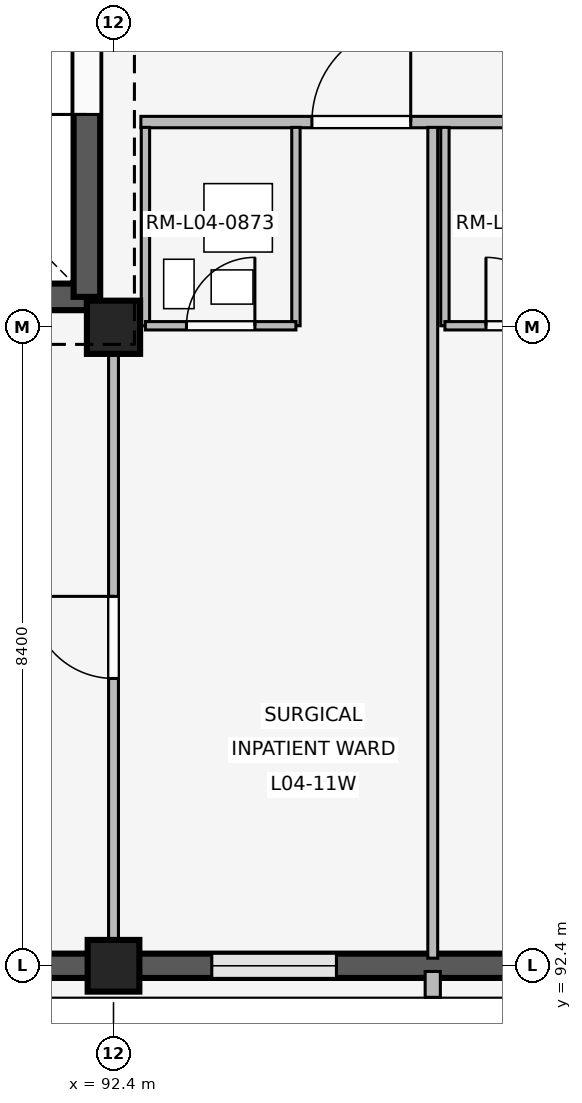
"""IFC4 building model, lengths in metres.
Left out: names, types, materials, properties, quantities, classifications, styles, units other than length and angle.
Written with IfcOpenShell. Run it as: python <this file> out.ifc"""

import sys

from ifc_helpers import new_model, si_unit, direction, frame, frame_2d, origin, origin_2d, place, context, subcontext, project, spatial, rectangle, extrude, element, fill, save


model = new_model("IFC4")
c1 = context("Model", 3, precision=1e-05, world=origin(), true_north=direction((0.0, 1.0)))
c2 = subcontext(c1, "Body", "Model", "MODEL_VIEW")
j1 = project(units=[si_unit("LENGTHUNIT", "METRE"), si_unit("PLANEANGLEUNIT", "RADIAN")], contexts=[c1])
p1 = place(None, origin())
s1 = spatial("IfcSite", under=j1, at=p1, CompositionType="ELEMENT")
p2 = place(p1, origin())
s2 = spatial("IfcBuilding", under=s1, at=p2, CompositionType="ELEMENT")
p3 = place(p2, frame((0.0, 0.0, 16.2)))
s3 = spatial("IfcBuildingStorey", under=s2, at=p3, CompositionType="ELEMENT", Elevation=16.2)
p4 = place(p3, frame((92.4, 92.4, 0.0), z_axis=(0.0, 0.0, 1.0), x_axis=(1.0, 0.0, 0.0)))
e1 = element("IfcColumn", 1, at=p4, inside=s3, PredefinedType="COLUMN", context=c2, shape_type="SweptSolid", body=[
    extrude(rectangle(XDim=0.68, YDim=0.68, at=origin_2d()), origin(), (0.0, 0.0, 1.0), 4.2),
])
p5 = place(p3, frame((92.4, 100.8, 0.0), z_axis=(0.0, 0.0, 1.0), x_axis=(1.0, 0.0, 0.0)))
e2 = element("IfcColumn", 2, at=p5, inside=s3, PredefinedType="COLUMN", context=c2, shape_type="SweptSolid", body=[
    extrude(rectangle(XDim=0.7, YDim=0.7, at=origin_2d()), origin(), (0.0, 0.0, 1.0), 4.2),
])
p6 = place(p3, frame((92.065, 92.4, 0.0), z_axis=(0.0, 0.0, 1.0), x_axis=(-1.0, 0.0, 0.0)))
e3 = element("IfcWall", 3, at=p6, inside=s3, PredefinedType="SOLIDWALL", context=c2, shape_type="SweptSolid", body=[
    extrude(rectangle(XDim=7.73, YDim=0.32, at=frame_2d((3.865, 0.0))), origin(), (0.0, 0.0, 1.0), 3.32),
])
p7 = place(p6, frame((1.228, 0.0, 0.85)))
e4 = element("IfcOpeningElement", 4, at=p7, cuts=e3, PredefinedType="OPENING", context=c2, shape_type="SweptSolid", body=[
    extrude(rectangle(XDim=1.1, YDim=1.6, at=frame_2d((0.55, 0.8))), frame((0.0, 0.17, 0.0), z_axis=(0.0, -1.0, 0.0), x_axis=(1.0, 0.0, 0.0)), (0.0, 0.0, 1.0), 0.34),
])
p8 = place(p6, frame((5.402, 0.0, 0.85)))
e5 = element("IfcOpeningElement", 5, at=p8, cuts=e3, PredefinedType="OPENING", context=c2, shape_type="SweptSolid", body=[
    extrude(rectangle(XDim=1.1, YDim=1.6, at=frame_2d((0.55, 0.8))), frame((0.0, 0.17, 0.0), z_axis=(0.0, -1.0, 0.0), x_axis=(1.0, 0.0, 0.0)), (0.0, 0.0, 1.0), 0.34),
])
p9 = place(p3, frame((100.465, 92.4, 0.0), z_axis=(0.0, 0.0, 1.0), x_axis=(-1.0, 0.0, 0.0)))
e6 = element("IfcWall", 6, at=p9, inside=s3, PredefinedType="SOLIDWALL", context=c2, shape_type="SweptSolid", body=[
    extrude(rectangle(XDim=7.73, YDim=0.32, at=frame_2d((3.865, 0.0))), origin(), (0.0, 0.0, 1.0), 3.32),
])
p10 = place(p9, frame((0.958, 0.0, 0.85)))
e7 = element("IfcOpeningElement", 7, at=p10, cuts=e6, PredefinedType="OPENING", context=c2, shape_type="SweptSolid", body=[
    extrude(rectangle(XDim=1.64, YDim=1.75, at=frame_2d((0.82, 0.875))), frame((0.0, 0.17, 0.0), z_axis=(0.0, -1.0, 0.0), x_axis=(1.0, 0.0, 0.0)), (0.0, 0.0, 1.0), 0.34),
])
p11 = place(p9, frame((5.132, 0.0, 0.85)))
e8 = element("IfcOpeningElement", 8, at=p11, cuts=e6, PredefinedType="OPENING", context=c2, shape_type="SweptSolid", body=[
    extrude(rectangle(XDim=1.64, YDim=1.75, at=frame_2d((0.82, 0.875))), frame((0.0, 0.17, 0.0), z_axis=(0.0, -1.0, 0.0), x_axis=(1.0, 0.0, 0.0)), (0.0, 0.0, 1.0), 0.34),
])
p12 = place(p3, frame((96.6, 92.325, 0.0), z_axis=(0.0, 0.0, 1.0), x_axis=(0.0, -1.0, 0.0)))
e9 = element("IfcWall", 9, at=p12, inside=s3, PredefinedType="ELEMENTEDWALL", context=c2, shape_type="SweptSolid", body=[
    extrude(rectangle(XDim=0.34, YDim=0.2, at=frame_2d((0.17, 0.0))), origin(), (0.0, 0.0, 1.0), 3.3),
])
p13 = place(p3, frame((84.55, 101.2, 0.0), z_axis=(0.0, 0.0, 1.0), x_axis=(1.0, 0.0, 0.0)))
e10 = element("IfcWall", 10, at=p13, inside=s3, PredefinedType="SHEAR", context=c2, shape_type="SweptSolid", body=[
    extrude(rectangle(XDim=7.5, YDim=0.35, at=frame_2d((3.75, 0.0))), origin(), (0.0, 0.0, 1.0), 3.92),
])
p14 = place(p13, frame((4.85, 0.0, 0.0)))
e11 = element("IfcOpeningElement", 11, at=p14, cuts=e10, PredefinedType="OPENING", context=c2, shape_type="SweptSolid", body=[
    extrude(rectangle(XDim=1.2, YDim=2.2, at=frame_2d((0.6, 1.1))), frame((0.0, 0.185, 0.0), z_axis=(0.0, -1.0, 0.0), x_axis=(1.0, 0.0, 0.0)), (0.0, 0.0, 1.0), 0.37),
])
p15 = place(p3, frame((92.05, 101.2, 0.0), z_axis=(0.0, 0.0, 1.0), x_axis=(0.0, 1.0, 0.0)))
e12 = element("IfcWall", 12, at=p15, inside=s3, PredefinedType="SHEAR", context=c2, shape_type="SweptSolid", body=[
    extrude(rectangle(XDim=7.55, YDim=0.35, at=frame_2d((3.775, 0.0))), origin(), (0.0, 0.0, 1.0), 3.92),
])
p16 = place(p15, frame((2.4, 0.0, 0.0)))
e13 = element("IfcOpeningElement", 13, at=p16, cuts=e12, PredefinedType="OPENING", context=c2, shape_type="SweptSolid", body=[
    extrude(rectangle(XDim=1.2, YDim=2.2, at=frame_2d((0.6, 1.1))), frame((0.0, 0.185, 0.0), z_axis=(0.0, -1.0, 0.0), x_axis=(1.0, 0.0, 0.0)), (0.0, 0.0, 1.0), 0.37),
])
p17 = place(p3, frame((92.4, 92.54, 0.0), z_axis=(0.0, 0.0, 1.0), x_axis=(0.0, 1.0, 0.0)))
e14 = element("IfcWall", 14, at=p17, inside=s3, PredefinedType="PARTITIONING", context=c2, shape_type="SweptSolid", body=[
    extrude(rectangle(XDim=8.21, YDim=0.13, at=frame_2d((4.105, 0.0))), origin(), (0.0, 0.0, 1.0), 3.3),
])
p18 = place(p17, frame((3.64, 0.0, 0.0)))
e15 = element("IfcOpeningElement", 15, at=p18, cuts=e14, PredefinedType="OPENING", context=c2, shape_type="SweptSolid", body=[
    extrude(rectangle(XDim=1.08, YDim=2.15, at=frame_2d((0.54, 1.075))), frame((0.0, 0.075, 0.0), z_axis=(0.0, -1.0, 0.0), x_axis=(1.0, 0.0, 0.0)), (0.0, 0.0, 1.0), 0.15),
])
p19 = place(p3, frame((92.76, 103.5, 0.0), z_axis=(0.0, 0.0, 1.0), x_axis=(1.0, 0.0, 0.0)))
e16 = element("IfcWall", 16, at=p19, inside=s3, PredefinedType="PARTITIONING", context=c2, shape_type="SweptSolid", body=[
    extrude(rectangle(XDim=7.96, YDim=0.15, at=frame_2d((3.98, 0.0))), origin(), (0.0, 0.0, 1.0), 3.3),
])
p20 = place(p19, frame((2.25, 0.0, 0.0)))
e17 = element("IfcOpeningElement", 17, at=p20, cuts=e16, PredefinedType="OPENING", context=c2, shape_type="SweptSolid", body=[
    extrude(rectangle(XDim=1.3, YDim=2.25, at=frame_2d((0.65, 1.125))), frame((0.0, 0.085, 0.0), z_axis=(0.0, -1.0, 0.0), x_axis=(1.0, 0.0, 0.0)), (0.0, 0.0, 1.0), 0.17),
])
p21 = place(p19, frame((5.95, 0.0, 0.0)))
e18 = element("IfcOpeningElement", 18, at=p21, cuts=e16, PredefinedType="OPENING", context=c2, shape_type="SweptSolid", body=[
    extrude(rectangle(XDim=1.3, YDim=2.25, at=frame_2d((0.65, 1.125))), frame((0.0, 0.085, 0.0), z_axis=(0.0, -1.0, 0.0), x_axis=(1.0, 0.0, 0.0)), (0.0, 0.0, 1.0), 0.17),
])
p22 = place(p3, frame((96.6, 92.5, 0.0), z_axis=(0.0, 0.0, 1.0), x_axis=(0.0, 1.0, 0.0)))
e19 = element("IfcWall", 19, at=p22, inside=s3, PredefinedType="PARTITIONING", context=c2, shape_type="SweptSolid", body=[
    extrude(rectangle(XDim=10.93, YDim=0.13, at=frame_2d((5.465, 0.0))), origin(), (0.0, 0.0, 1.0), 3.3),
])
for number, where, z_axis, x_axis in (
    (20, (92.82, 100.82, 0.0), (0.0, 0.0, 1.0), (0.0, 1.0, 0.0)),
    (21, (94.8, 100.82, 0.0), (0.0, 0.0, 1.0), (0.0, 1.0, 0.0)),
):
    element("IfcWall", number, at=place(p3, frame(where, z_axis=z_axis, x_axis=x_axis)), inside=s3, PredefinedType="PARTITIONING", context=c2, shape_type="SweptSolid", body=[
        extrude(rectangle(XDim=2.61, YDim=0.11, at=frame_2d((1.305, 0.0))), origin(), (0.0, 0.0, 1.0), 3.3),
    ])
p23 = place(p3, frame((92.82, 100.82, 0.0), z_axis=(0.0, 0.0, 1.0), x_axis=(1.0, 0.0, 0.0)))
e22 = element("IfcWall", 22, at=p23, inside=s3, PredefinedType="PARTITIONING", context=c2, shape_type="SweptSolid", body=[
    extrude(rectangle(XDim=1.98, YDim=0.11, at=frame_2d((0.99, 0.0))), origin(), (0.0, 0.0, 1.0), 3.3),
])
p24 = place(p23, frame((0.54, 0.0, 0.0)))
e23 = element("IfcOpeningElement", 23, at=p24, cuts=e22, PredefinedType="OPENING", context=c2, shape_type="SweptSolid", body=[
    extrude(rectangle(XDim=0.9, YDim=2.1, at=frame_2d((0.45, 1.05))), frame((0.0, 0.065, 0.0), z_axis=(0.0, -1.0, 0.0), x_axis=(1.0, 0.0, 0.0)), (0.0, 0.0, 1.0), 0.13),
])
p25 = place(p3, frame((96.76, 100.82, 0.0), z_axis=(0.0, 0.0, 1.0), x_axis=(0.0, 1.0, 0.0)))
e24 = element("IfcWall", 24, at=p25, inside=s3, PredefinedType="PARTITIONING", context=c2, shape_type="SweptSolid", body=[
    extrude(rectangle(XDim=2.61, YDim=0.11, at=frame_2d((1.305, 0.0))), origin(), (0.0, 0.0, 1.0), 3.3),
])
p26 = place(p3, frame((96.76, 100.82, 0.0), z_axis=(0.0, 0.0, 1.0), x_axis=(1.0, 0.0, 0.0)))
e25 = element("IfcWall", 25, at=p26, inside=s3, PredefinedType="PARTITIONING", context=c2, shape_type="SweptSolid", body=[
    extrude(rectangle(XDim=1.98, YDim=0.11, at=frame_2d((0.99, 0.0))), origin(), (0.0, 0.0, 1.0), 3.3),
])
p27 = place(p26, frame((0.54, 0.0, 0.0)))
e26 = element("IfcOpeningElement", 26, at=p27, cuts=e25, PredefinedType="OPENING", context=c2, shape_type="SweptSolid", body=[
    extrude(rectangle(XDim=0.9, YDim=2.1, at=frame_2d((0.45, 1.05))), frame((0.0, 0.065, 0.0), z_axis=(0.0, -1.0, 0.0), x_axis=(1.0, 0.0, 0.0)), (0.0, 0.0, 1.0), 0.13),
])
p28 = place(p11, origin())
e27 = element("IfcWindow", 27, at=p28, inside=s3, PartitioningType="SINGLE_PANEL", PredefinedType="WINDOW", context=c2, shape_type="SweptSolid", body=[
    extrude(rectangle(XDim=1.64, YDim=1.75, at=frame_2d((0.82, 0.875))), frame((0.0, 0.03, 0.0), z_axis=(0.0, -1.0, 0.0), x_axis=(1.0, 0.0, 0.0)), (0.0, 0.0, 1.0), 0.06),
])
fill(e8, e27)
p29 = place(p16, origin())
e28 = element("IfcDoor", 28, at=p29, inside=s3, OperationType="SINGLE_SWING_LEFT", PredefinedType="DOOR", context=c2, shape_type="SweptSolid", body=[
    extrude(rectangle(XDim=1.2, YDim=2.2, at=frame_2d((0.6, 1.1))), frame((0.0, 0.025, 0.0), z_axis=(0.0, -1.0, 0.0), x_axis=(1.0, 0.0, 0.0)), (0.0, 0.0, 1.0), 0.05),
])
fill(e13, e28)
p30 = place(p18, origin())
e29 = element("IfcDoor", 29, at=p30, inside=s3, OperationType="SINGLE_SWING_RIGHT", PredefinedType="DOOR", context=c2, shape_type="SweptSolid", body=[
    extrude(rectangle(XDim=1.08, YDim=2.15, at=frame_2d((0.54, 1.075))), frame((0.0, 0.025, 0.0), z_axis=(0.0, -1.0, 0.0), x_axis=(1.0, 0.0, 0.0)), (0.0, 0.0, 1.0), 0.05),
])
fill(e15, e29)
p31 = place(p20, origin())
e30 = element("IfcDoor", 30, at=p31, inside=s3, OperationType="SINGLE_SWING_RIGHT", PredefinedType="DOOR", context=c2, shape_type="SweptSolid", body=[
    extrude(rectangle(XDim=1.3, YDim=2.25, at=frame_2d((0.65, 1.125))), frame((0.0, 0.025, 0.0), z_axis=(0.0, -1.0, 0.0), x_axis=(1.0, 0.0, 0.0)), (0.0, 0.0, 1.0), 0.05),
])
fill(e17, e30)
p32 = place(p24, origin())
e31 = element("IfcDoor", 31, at=p32, inside=s3, OperationType="SINGLE_SWING_RIGHT", PredefinedType="DOOR", context=c2, shape_type="SweptSolid", body=[
    extrude(rectangle(XDim=0.9, YDim=2.1, at=frame_2d((0.45, 1.05))), frame((0.0, 0.025, 0.0), z_axis=(0.0, -1.0, 0.0), x_axis=(1.0, 0.0, 0.0)), (0.0, 0.0, 1.0), 0.05),
])
fill(e23, e31)
p33 = place(p27, origin())
e32 = element("IfcDoor", 32, at=p33, inside=s3, OperationType="SINGLE_SWING_LEFT", PredefinedType="DOOR", context=c2, shape_type="SweptSolid", body=[
    extrude(rectangle(XDim=0.9, YDim=2.1, at=frame_2d((0.45, 1.05))), frame((0.0, 0.025, 0.0), z_axis=(0.0, -1.0, 0.0), x_axis=(1.0, 0.0, 0.0)), (0.0, 0.0, 1.0), 0.05),
])
fill(e26, e32)
save(model, sys.argv[1])
